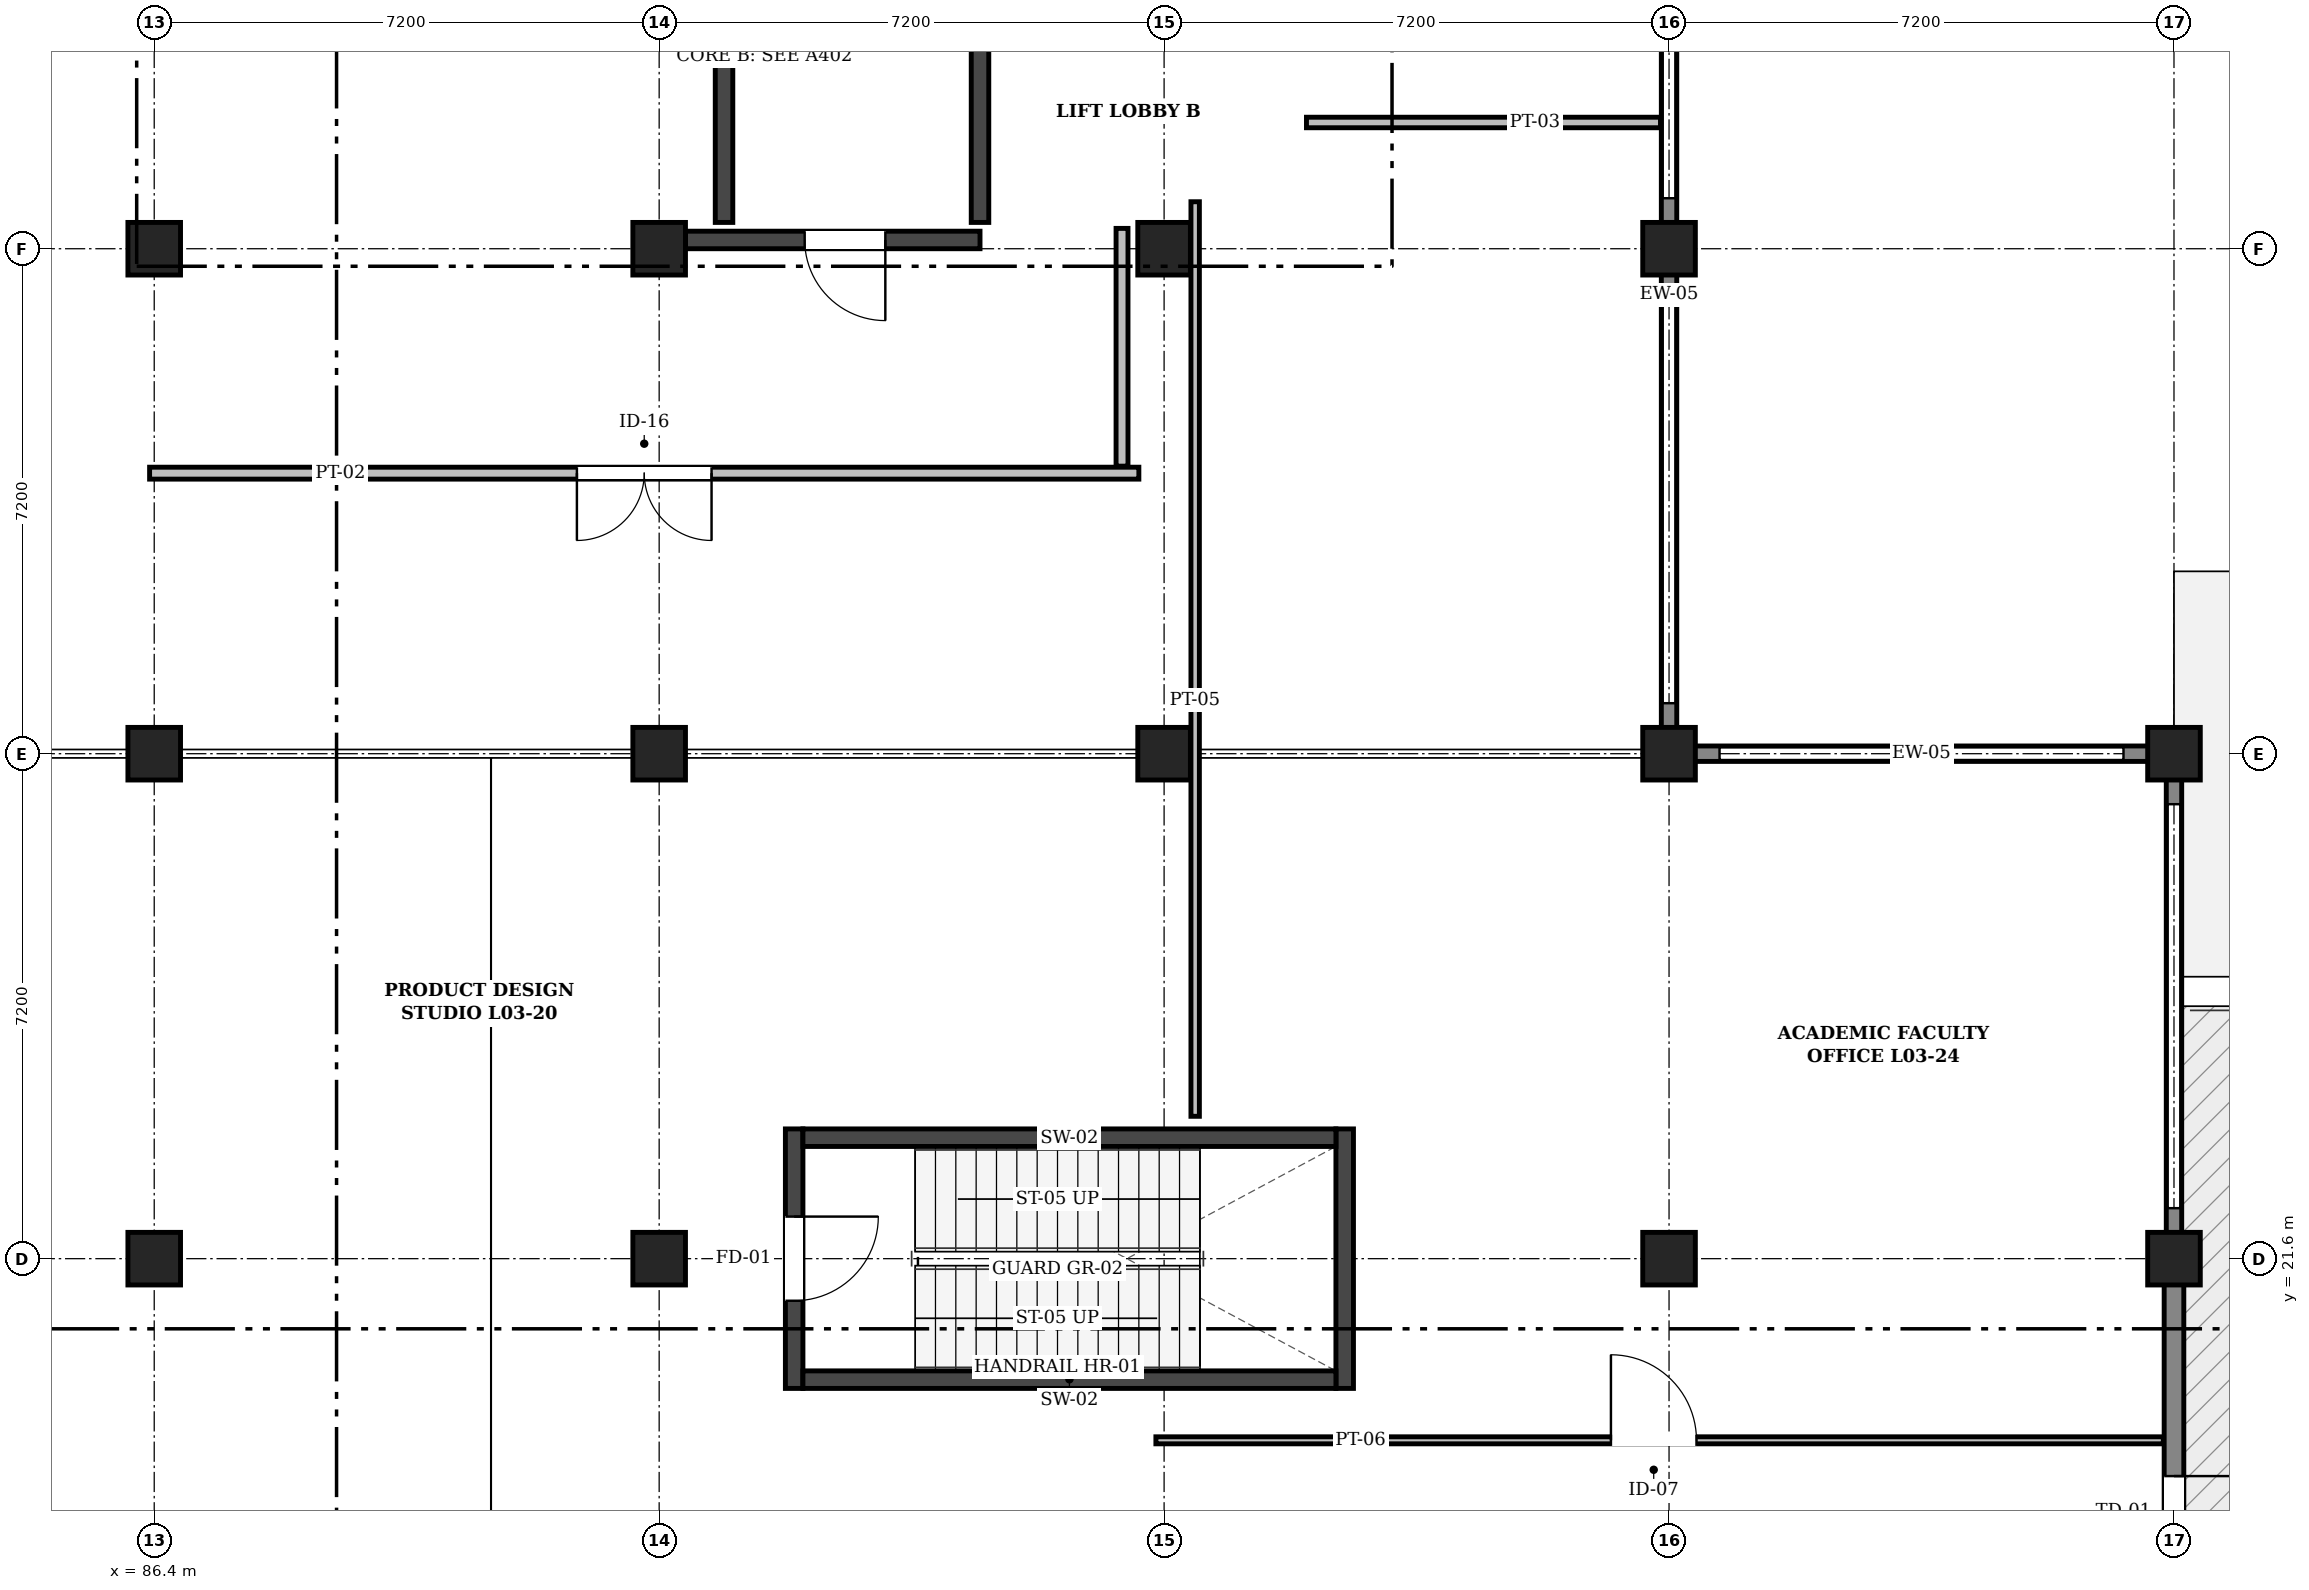
"""IFC4 building model, lengths in metres.
Left out: names, types, materials, properties, quantities, classifications, styles, units other than length and angle.
Written with IfcOpenShell. Run it as: python <this file> out.ifc"""

import sys

from ifc_helpers import new_model, si_unit, direction, frame, frame_2d, origin, origin_2d, place, context, subcontext, project, spatial, rectangle, extrude, element, fill, save


model = new_model("IFC4")
c1 = context("Model", 3, precision=1e-05, world=origin(), true_north=direction((0.0, 1.0)))
c2 = subcontext(c1, "Body", "Model", "MODEL_VIEW")
j1 = project(units=[si_unit("LENGTHUNIT", "METRE"), si_unit("PLANEANGLEUNIT", "RADIAN")], contexts=[c1])
p1 = place(None, origin())
s1 = spatial("IfcSite", under=j1, at=p1, CompositionType="ELEMENT")
p2 = place(p1, origin())
s2 = spatial("IfcBuilding", under=s1, at=p2, CompositionType="ELEMENT")
p3 = place(p2, frame((0.0, 0.0, 14.4)))
s3 = spatial("IfcBuildingStorey", under=s2, at=p3, CompositionType="ELEMENT", Elevation=14.4)
for number, where, z_axis, x_axis in (
    (1, (86.4, 21.6, 0.0), (0.0, 0.0, 1.0), (1.0, 0.0, 0.0)),
    (2, (86.4, 28.8, 0.0), (0.0, 0.0, 1.0), (1.0, 0.0, 0.0)),
    (3, (86.4, 36.0, 0.0), (0.0, 0.0, 1.0), (1.0, 0.0, 0.0)),
    (4, (93.6, 21.6, 0.0), (0.0, 0.0, 1.0), (1.0, 0.0, 0.0)),
    (5, (93.6, 28.8, 0.0), (0.0, 0.0, 1.0), (1.0, 0.0, 0.0)),
    (6, (93.6, 36.0, 0.0), (0.0, 0.0, 1.0), (1.0, 0.0, 0.0)),
    (7, (100.8, 28.8, 0.0), (0.0, 0.0, 1.0), (1.0, 0.0, 0.0)),
    (8, (100.8, 36.0, 0.0), (0.0, 0.0, 1.0), (1.0, 0.0, 0.0)),
    (9, (108.0, 21.6, 0.0), (0.0, 0.0, 1.0), (1.0, 0.0, 0.0)),
    (10, (108.0, 28.8, 0.0), (0.0, 0.0, 1.0), (1.0, 0.0, 0.0)),
    (11, (108.0, 36.0, 0.0), (0.0, 0.0, 1.0), (1.0, 0.0, 0.0)),
    (12, (115.2, 21.6, 0.0), (0.0, 0.0, 1.0), (1.0, 0.0, 0.0)),
    (13, (115.2, 28.8, 0.0), (0.0, 0.0, 1.0), (1.0, 0.0, 0.0)),
):
    element("IfcColumn", number, at=place(p3, frame(where, z_axis=z_axis, x_axis=x_axis)), inside=s3, PredefinedType="COLUMN", context=c2, shape_type="SweptSolid", body=[
        extrude(rectangle(XDim=0.75, YDim=0.75, at=origin_2d()), origin(), (0.0, 0.0, 1.0), 4.5),
    ])
p4 = place(p3, frame((108.0, 43.2, 0.0), z_axis=(0.0, 0.0, 1.0), x_axis=(0.0, -1.0, 0.0)))
e14 = element("IfcWall", 14, at=p4, inside=s3, PredefinedType="SOLIDWALL", context=c2, shape_type="SweptSolid", body=[
    extrude(rectangle(XDim=7.2, YDim=0.22, at=frame_2d((3.6, 0.0))), origin(), (0.0, 0.0, 1.0), 1.24),
])
p5 = place(p3, frame((108.0, 36.0, 0.0), z_axis=(0.0, 0.0, 1.0), x_axis=(0.0, -1.0, 0.0)))
e15 = element("IfcWall", 15, at=p5, inside=s3, PredefinedType="SOLIDWALL", context=c2, shape_type="SweptSolid", body=[
    extrude(rectangle(XDim=7.048, YDim=0.22, at=frame_2d((3.524, 0.0))), origin(), (0.0, 0.0, 1.0), 1.24),
])
p6 = place(p3, frame((107.85, 28.8, 0.0), z_axis=(0.0, 0.0, 1.0), x_axis=(1.0, 0.0, 0.0)))
e16 = element("IfcWall", 16, at=p6, inside=s3, PredefinedType="SOLIDWALL", context=c2, shape_type="SweptSolid", body=[
    extrude(rectangle(XDim=7.5, YDim=0.22, at=frame_2d((3.75, 0.0))), origin(), (0.0, 0.0, 1.0), 1.24),
])
p7 = place(p3, frame((115.2, 28.648, 0.0), z_axis=(0.0, 0.0, 1.0), x_axis=(0.0, -1.0, 0.0)))
e17 = element("IfcWall", 17, at=p7, inside=s3, PredefinedType="SOLIDWALL", context=c2, shape_type="SweptSolid", body=[
    extrude(rectangle(XDim=7.048, YDim=0.22, at=frame_2d((3.524, 0.0))), origin(), (0.0, 0.0, 1.0), 1.24),
])
p8 = place(p3, frame((115.2, 21.6, 0.0), z_axis=(0.0, 0.0, 1.0), x_axis=(0.0, -1.0, 0.0)))
e18 = element("IfcWall", 18, at=p8, inside=s3, PredefinedType="SOLIDWALL", context=c2, shape_type="SweptSolid", body=[
    extrude(rectangle(XDim=7.2, YDim=0.28, at=frame_2d((3.6, 0.0))), origin(), (0.0, 0.0, 1.0), 4.22),
])
p9 = place(p8, frame((3.1, 0.0, 0.0)))
e19 = element("IfcOpeningElement", 19, at=p9, cuts=e18, PredefinedType="OPENING", context=c2, shape_type="SweptSolid", body=[
    extrude(rectangle(XDim=1.0, YDim=2.15, at=frame_2d((0.5, 1.075))), frame((0.0, 0.152, 0.0), z_axis=(0.0, -1.0, 0.0), x_axis=(1.0, 0.0, 0.0)), (0.0, 0.0, 1.0), 0.304),
])
p10 = place(p3, frame((95.525, 19.75, 0.0), z_axis=(0.0, 0.0, 1.0), x_axis=(0.0, 1.0, 0.0)))
e20 = element("IfcWall", 20, at=p10, inside=s3, PredefinedType="SHEAR", context=c2, shape_type="SweptSolid", body=[
    extrude(rectangle(XDim=3.7, YDim=0.25, at=frame_2d((1.85, 0.0))), origin(), (0.0, 0.0, 1.0), 4.25),
])
p11 = place(p10, frame((1.25, 0.0, 0.0)))
e21 = element("IfcOpeningElement", 21, at=p11, cuts=e20, PredefinedType="OPENING", context=c2, shape_type="SweptSolid", body=[
    extrude(rectangle(XDim=1.2, YDim=2.15, at=frame_2d((0.6, 1.075))), frame((0.0, 0.137, 0.0), z_axis=(0.0, -1.0, 0.0), x_axis=(1.0, 0.0, 0.0)), (0.0, 0.0, 1.0), 0.274),
])
p12 = place(p3, frame((103.375, 19.75, 0.0), z_axis=(0.0, 0.0, 1.0), x_axis=(0.0, 1.0, 0.0)))
e22 = element("IfcWall", 22, at=p12, inside=s3, PredefinedType="SHEAR", context=c2, shape_type="SweptSolid", body=[
    extrude(rectangle(XDim=3.7, YDim=0.25, at=frame_2d((1.85, 0.0))), origin(), (0.0, 0.0, 1.0), 4.25),
])
for number, where, z_axis, x_axis in (
    (23, (95.65, 19.875, 0.0), (0.0, 0.0, 1.0), (1.0, 0.0, 0.0)),
    (24, (95.65, 23.325, 0.0), (0.0, 0.0, 1.0), (1.0, 0.0, 0.0)),
):
    element("IfcWall", number, at=place(p3, frame(where, z_axis=z_axis, x_axis=x_axis)), inside=s3, PredefinedType="SHEAR", context=c2, shape_type="SweptSolid", body=[
        extrude(rectangle(XDim=7.6, YDim=0.25, at=frame_2d((3.8, 0.0))), origin(), (0.0, 0.0, 1.0), 4.25),
    ])
p13 = place(p3, frame((93.975, 36.125, 0.0), z_axis=(0.0, 0.0, 1.0), x_axis=(1.0, 0.0, 0.0)))
e25 = element("IfcWall", 25, at=p13, inside=s3, PredefinedType="SHEAR", context=c2, shape_type="SweptSolid", body=[
    extrude(rectangle(XDim=4.2, YDim=0.25, at=frame_2d((2.1, 0.0))), origin(), (0.0, 0.0, 1.0), 4.25),
])
p14 = place(p13, frame((1.7, 0.0, 0.0)))
e26 = element("IfcOpeningElement", 26, at=p14, cuts=e25, PredefinedType="OPENING", context=c2, shape_type="SweptSolid", body=[
    extrude(rectangle(XDim=1.15, YDim=2.15, at=frame_2d((0.575, 1.075))), frame((0.0, 0.137, 0.0), z_axis=(0.0, -1.0, 0.0), x_axis=(1.0, 0.0, 0.0)), (0.0, 0.0, 1.0), 0.274),
])
p15 = place(p3, frame((94.525, 36.375, 0.0), z_axis=(0.0, 0.0, 1.0), x_axis=(0.0, 1.0, 0.0)))
e27 = element("IfcWall", 27, at=p15, inside=s3, PredefinedType="SHEAR", context=c2, shape_type="SweptSolid", body=[
    extrude(rectangle(XDim=2.77, YDim=0.25, at=frame_2d((1.385, 0.0))), origin(), (0.0, 0.0, 1.0), 4.25),
])
p16 = place(p3, frame((98.175, 36.375, 0.0), z_axis=(0.0, 0.0, 1.0), x_axis=(0.0, 1.0, 0.0)))
e28 = element("IfcWall", 28, at=p16, inside=s3, PredefinedType="SHEAR", context=c2, shape_type="SweptSolid", body=[
    extrude(rectangle(XDim=3.225, YDim=0.25, at=frame_2d((1.613, 0.0))), origin(), (0.0, 0.0, 1.0), 4.25),
])
p17 = place(p3, frame((86.334, 32.8, 0.0), z_axis=(0.0, 0.0, 1.0), x_axis=(1.0, 0.0, 0.0)))
e29 = element("IfcWall", 29, at=p17, inside=s3, PredefinedType="PARTITIONING", context=c2, shape_type="SweptSolid", body=[
    extrude(rectangle(XDim=14.106, YDim=0.17, at=frame_2d((7.053, 0.0))), origin(), (0.0, 0.0, 1.0), 4.16),
])
p18 = place(p17, frame((6.093, 0.0, 0.0)))
e30 = element("IfcOpeningElement", 30, at=p18, cuts=e29, PredefinedType="OPENING", context=c2, shape_type="SweptSolid", body=[
    extrude(rectangle(XDim=1.92, YDim=2.32, at=frame_2d((0.96, 1.16))), frame((0.0, 0.097, 0.0), z_axis=(0.0, -1.0, 0.0), x_axis=(1.0, 0.0, 0.0)), (0.0, 0.0, 1.0), 0.194),
])
p19 = place(p3, frame((100.2, 32.9, 0.0), z_axis=(0.0, 0.0, 1.0), x_axis=(0.0, 1.0, 0.0)))
e31 = element("IfcWall", 31, at=p19, inside=s3, PredefinedType="PARTITIONING", context=c2, shape_type="SweptSolid", body=[
    extrude(rectangle(XDim=3.39, YDim=0.17, at=frame_2d((1.695, 0.0))), origin(), (0.0, 0.0, 1.0), 4.16),
])
p20 = place(p3, frame((101.243, 23.63, 0.0), z_axis=(0.0, 0.0, 1.0), x_axis=(0.0, 1.0, 0.0)))
e32 = element("IfcWall", 32, at=p20, inside=s3, PredefinedType="PARTITIONING", context=c2, shape_type="SweptSolid", body=[
    extrude(rectangle(XDim=13.04, YDim=0.12, at=frame_2d((6.52, 0.0))), origin(), (0.0, 0.0, 1.0), 4.16),
])
p21 = place(p3, frame((100.683, 19.01, 0.0), z_axis=(0.0, 0.0, 1.0), x_axis=(1.0, 0.0, 0.0)))
e33 = element("IfcWall", 33, at=p21, inside=s3, PredefinedType="PARTITIONING", context=c2, shape_type="SweptSolid", body=[
    extrude(rectangle(XDim=14.365, YDim=0.1, at=frame_2d((7.183, 0.0))), origin(), (0.0, 0.0, 1.0), 4.16),
])
p22 = place(p21, frame((6.489, 0.0, 0.0)))
e34 = element("IfcOpeningElement", 34, at=p22, cuts=e33, PredefinedType="OPENING", context=c2, shape_type="SweptSolid", body=[
    extrude(rectangle(XDim=1.22, YDim=2.22, at=frame_2d((0.61, 1.11))), frame((0.0, 0.062, 0.0), z_axis=(0.0, -1.0, 0.0), x_axis=(1.0, 0.0, 0.0)), (0.0, 0.0, 1.0), 0.124),
])
p23 = place(p3, frame((102.83, 37.8, 0.0), z_axis=(0.0, 0.0, 1.0), x_axis=(1.0, 0.0, 0.0)))
e35 = element("IfcWall", 35, at=p23, inside=s3, PredefinedType="PARTITIONING", context=c2, shape_type="SweptSolid", body=[
    extrude(rectangle(XDim=5.048, YDim=0.15, at=frame_2d((2.524, 0.0))), origin(), (0.0, 0.0, 1.0), 4.16),
])
p24 = place(p9, origin())
e36 = element("IfcDoor", 36, at=p24, inside=s3, OperationType="SINGLE_SWING_LEFT", PredefinedType="DOOR", context=c2, shape_type="SweptSolid", body=[
    extrude(rectangle(XDim=1.0, YDim=2.15, at=frame_2d((0.5, 1.075))), frame((0.0, 0.025, 0.0), z_axis=(0.0, -1.0, 0.0), x_axis=(1.0, 0.0, 0.0)), (0.0, 0.0, 1.0), 0.05),
])
fill(e19, e36)
p25 = place(p11, frame((1.2, 0.0, 0.0), z_axis=(0.0, 0.0, 1.0), x_axis=(-1.0, 0.0, 0.0)))
e37 = element("IfcDoor", 37, at=p25, inside=s3, OperationType="SINGLE_SWING_LEFT", PredefinedType="DOOR", context=c2, shape_type="SweptSolid", body=[
    extrude(rectangle(XDim=1.2, YDim=2.15, at=frame_2d((0.6, 1.075))), frame((0.0, 0.025, 0.0), z_axis=(0.0, -1.0, 0.0), x_axis=(1.0, 0.0, 0.0)), (0.0, 0.0, 1.0), 0.05),
])
fill(e21, e37)
p26 = place(p14, frame((1.15, 0.0, 0.0), z_axis=(0.0, 0.0, 1.0), x_axis=(-1.0, 0.0, 0.0)))
e38 = element("IfcDoor", 38, at=p26, inside=s3, OperationType="SINGLE_SWING_LEFT", PredefinedType="DOOR", context=c2, shape_type="SweptSolid", body=[
    extrude(rectangle(XDim=1.15, YDim=2.15, at=frame_2d((0.575, 1.075))), frame((0.0, 0.025, 0.0), z_axis=(0.0, -1.0, 0.0), x_axis=(1.0, 0.0, 0.0)), (0.0, 0.0, 1.0), 0.05),
])
fill(e26, e38)
p27 = place(p18, frame((1.92, 0.0, 0.0), z_axis=(0.0, 0.0, 1.0), x_axis=(-1.0, 0.0, 0.0)))
e39 = element("IfcDoor", 39, at=p27, inside=s3, OperationType="DOUBLE_DOOR_SINGLE_SWING", PredefinedType="DOOR", context=c2, shape_type="SweptSolid", body=[
    extrude(rectangle(XDim=1.92, YDim=2.32, at=frame_2d((0.96, 1.16))), frame((0.0, 0.025, 0.0), z_axis=(0.0, -1.0, 0.0), x_axis=(1.0, 0.0, 0.0)), (0.0, 0.0, 1.0), 0.05),
])
fill(e30, e39)
p28 = place(p22, origin())
e40 = element("IfcDoor", 40, at=p28, inside=s3, OperationType="SINGLE_SWING_LEFT", PredefinedType="DOOR", context=c2, shape_type="SweptSolid", body=[
    extrude(rectangle(XDim=1.22, YDim=2.22, at=frame_2d((0.61, 1.11))), frame((0.0, 0.025, 0.0), z_axis=(0.0, -1.0, 0.0), x_axis=(1.0, 0.0, 0.0)), (0.0, 0.0, 1.0), 0.05),
])
fill(e34, e40)
save(model, sys.argv[1])
